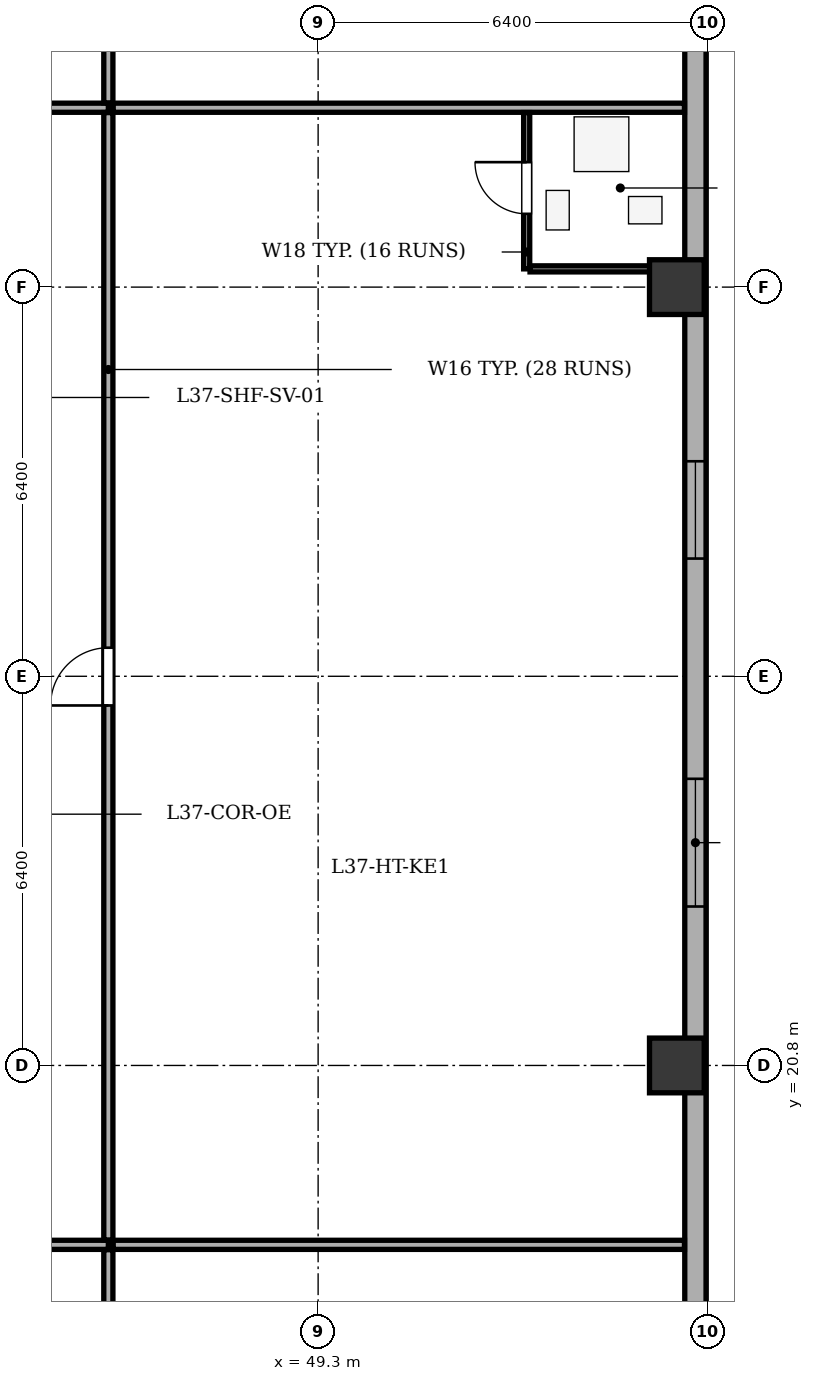
"""IFC4 building model, lengths in metres.
Left out: names, types, materials, properties, quantities, classifications, styles, units other than length and angle.
Written with IfcOpenShell. Run it as: python <this file> out.ifc"""

import sys

from ifc_helpers import new_model, si_unit, direction, frame, frame_2d, origin, origin_2d, place, context, subcontext, project, spatial, rectangle, extrude, element, fill, save


model = new_model("IFC4")
c1 = context("Model", 3, precision=1e-05, world=origin(), true_north=direction((0.0, 1.0)))
c2 = subcontext(c1, "Body", "Model", "MODEL_VIEW")
j1 = project(units=[si_unit("LENGTHUNIT", "METRE"), si_unit("PLANEANGLEUNIT", "RADIAN")], contexts=[c1])
p1 = place(None, origin())
s1 = spatial("IfcSite", under=j1, at=p1, CompositionType="ELEMENT")
p2 = place(p1, origin())
s2 = spatial("IfcBuilding", under=s1, at=p2, CompositionType="ELEMENT")
p3 = place(p2, frame((0.0, 0.0, 148.3)))
s3 = spatial("IfcBuildingStorey", under=s2, at=p3, CompositionType="ELEMENT", Elevation=148.3)
for number, where, z_axis, x_axis in (
    (1, (55.2, 20.8, 0.0), (0.0, 0.0, 1.0), (1.0, 0.0, 0.0)),
    (2, (55.2, 33.6, 0.0), (0.0, 0.0, 1.0), (1.0, 0.0, 0.0)),
):
    element("IfcColumn", number, at=place(p3, frame(where, z_axis=z_axis, x_axis=x_axis)), inside=s3, PredefinedType="COLUMN", context=c2, shape_type="SweptSolid", body=[
        extrude(rectangle(XDim=0.9, YDim=0.9, at=origin_2d()), origin(), (0.0, 0.0, 1.0), 3.5),
    ])
p4 = place(p3, frame((55.505, 41.5, 0.0), z_axis=(0.0, 0.0, 1.0), x_axis=(0.0, -1.0, 0.0)))
e3 = element("IfcWall", 3, at=p4, inside=s3, PredefinedType="STANDARD", context=c2, shape_type="SweptSolid", body=[
    extrude(rectangle(XDim=35.0, YDim=0.35, at=frame_2d((17.5, 0.0))), origin(), (0.0, 0.0, 1.0), 2.785),
])
p5 = place(p4, frame((1.813, 0.0, 0.75)))
e4 = element("IfcOpeningElement", 4, at=p5, cuts=e3, PredefinedType="OPENING", context=c2, shape_type="SweptSolid", body=[
    extrude(rectangle(XDim=1.6, YDim=1.75, at=frame_2d((0.8, 0.875))), frame((0.0, 0.185, 0.0), z_axis=(0.0, -1.0, 0.0), x_axis=(1.0, 0.0, 0.0)), (0.0, 0.0, 1.0), 0.37),
])
p6 = place(p4, frame((10.764, 0.0, 0.75)))
e5 = element("IfcOpeningElement", 5, at=p6, cuts=e3, PredefinedType="OPENING", context=c2, shape_type="SweptSolid", body=[
    extrude(rectangle(XDim=1.6, YDim=1.75, at=frame_2d((0.8, 0.875))), frame((0.0, 0.185, 0.0), z_axis=(0.0, -1.0, 0.0), x_axis=(1.0, 0.0, 0.0)), (0.0, 0.0, 1.0), 0.37),
])
p7 = place(p4, frame((15.986, 0.0, 0.75)))
e6 = element("IfcOpeningElement", 6, at=p7, cuts=e3, PredefinedType="OPENING", context=c2, shape_type="SweptSolid", body=[
    extrude(rectangle(XDim=2.1, YDim=1.75, at=frame_2d((1.05, 0.875))), frame((0.0, 0.185, 0.0), z_axis=(0.0, -1.0, 0.0), x_axis=(1.0, 0.0, 0.0)), (0.0, 0.0, 1.0), 0.37),
])
p8 = place(p4, frame((25.97, 0.0, 0.75)))
e7 = element("IfcOpeningElement", 7, at=p8, cuts=e3, PredefinedType="OPENING", context=c2, shape_type="SweptSolid", body=[
    extrude(rectangle(XDim=1.6, YDim=1.75, at=frame_2d((0.8, 0.875))), frame((0.0, 0.185, 0.0), z_axis=(0.0, -1.0, 0.0), x_axis=(1.0, 0.0, 0.0)), (0.0, 0.0, 1.0), 0.37),
])
p9 = place(p4, frame((30.555, 0.0, 0.75)))
e8 = element("IfcOpeningElement", 8, at=p9, cuts=e3, PredefinedType="OPENING", context=c2, shape_type="SweptSolid", body=[
    extrude(rectangle(XDim=2.1, YDim=1.75, at=frame_2d((1.05, 0.875))), frame((0.0, 0.185, 0.0), z_axis=(0.0, -1.0, 0.0), x_axis=(1.0, 0.0, 0.0)), (0.0, 0.0, 1.0), 0.37),
])
p10 = place(p3, frame((30.252, 17.85, 0.0), z_axis=(0.0, 0.0, 1.0), x_axis=(1.0, 0.0, 0.0)))
e9 = element("IfcWall", 9, at=p10, inside=s3, PredefinedType="PARTITIONING", context=c2, shape_type="SweptSolid", body=[
    extrude(rectangle(XDim=15.598, YDim=0.15, at=frame_2d((7.799, 0.0))), origin(), (0.0, 0.0, 1.0), 3.2),
])
p11 = place(p10, frame((7.239, 0.0, 0.0)))
e10 = element("IfcOpeningElement", 10, at=p11, cuts=e9, PredefinedType="OPENING", context=c2, shape_type="SweptSolid", body=[
    extrude(rectangle(XDim=1.0, YDim=2.1, at=frame_2d((0.5, 1.05))), frame((0.0, 0.085, 0.0), z_axis=(0.0, -1.0, 0.0), x_axis=(1.0, 0.0, 0.0)), (0.0, 0.0, 1.0), 0.17),
])
p12 = place(p3, frame((45.85, 1.875, 0.0), z_axis=(0.0, 0.0, 1.0), x_axis=(0.0, 1.0, 0.0)))
e11 = element("IfcWall", 11, at=p12, inside=s3, PredefinedType="PARTITIONING", context=c2, shape_type="SweptSolid", body=[
    extrude(rectangle(XDim=15.895, YDim=0.15, at=frame_2d((7.948, 0.0))), origin(), (0.0, 0.0, 1.0), 3.2),
])
p13 = place(p3, frame((41.771, 36.55, 0.0), z_axis=(0.0, 0.0, 1.0), x_axis=(1.0, 0.0, 0.0)))
e12 = element("IfcWall", 12, at=p13, inside=s3, PredefinedType="PARTITIONING", context=c2, shape_type="SweptSolid", body=[
    extrude(rectangle(XDim=4.079, YDim=0.15, at=frame_2d((2.04, 0.0))), origin(), (0.0, 0.0, 1.0), 3.2),
])
p14 = place(p13, frame((1.56, 0.0, 0.0)))
e13 = element("IfcOpeningElement", 13, at=p14, cuts=e12, PredefinedType="OPENING", context=c2, shape_type="SweptSolid", body=[
    extrude(rectangle(XDim=0.95, YDim=2.1, at=frame_2d((0.475, 1.05))), frame((0.0, 0.085, 0.0), z_axis=(0.0, -1.0, 0.0), x_axis=(1.0, 0.0, 0.0)), (0.0, 0.0, 1.0), 0.17),
])
p15 = place(p3, frame((45.85, 36.63, 0.0), z_axis=(0.0, 0.0, 1.0), x_axis=(0.0, 1.0, 0.0)))
e14 = element("IfcWall", 14, at=p15, inside=s3, PredefinedType="PARTITIONING", context=c2, shape_type="SweptSolid", body=[
    extrude(rectangle(XDim=9.495, YDim=0.15, at=frame_2d((4.748, 0.0))), origin(), (0.0, 0.0, 1.0), 3.2),
])
for number, where, z_axis, x_axis in (
    (15, (45.93, 17.85, 0.0), (0.0, 0.0, 1.0), (1.0, 0.0, 0.0)),
    (16, (45.93, 36.55, 0.0), (0.0, 0.0, 1.0), (1.0, 0.0, 0.0)),
):
    element("IfcWall", number, at=place(p3, frame(where, z_axis=z_axis, x_axis=x_axis)), inside=s3, PredefinedType="PARTITIONING", context=c2, shape_type="SweptSolid", body=[
        extrude(rectangle(XDim=9.395, YDim=0.15, at=frame_2d((4.698, 0.0))), origin(), (0.0, 0.0, 1.0), 3.2),
    ])
p16 = place(p3, frame((45.85, 17.93, 0.0), z_axis=(0.0, 0.0, 1.0), x_axis=(0.0, 1.0, 0.0)))
e17 = element("IfcWall", 17, at=p16, inside=s3, PredefinedType="PARTITIONING", context=c2, shape_type="SweptSolid", body=[
    extrude(rectangle(XDim=18.54, YDim=0.15, at=frame_2d((9.27, 0.0))), origin(), (0.0, 0.0, 1.0), 3.2),
])
p17 = place(p16, frame((8.79, 0.0, 0.0)))
e18 = element("IfcOpeningElement", 18, at=p17, cuts=e17, PredefinedType="OPENING", context=c2, shape_type="SweptSolid", body=[
    extrude(rectangle(XDim=0.95, YDim=2.1, at=frame_2d((0.475, 1.05))), frame((0.0, 0.085, 0.0), z_axis=(0.0, -1.0, 0.0), x_axis=(1.0, 0.0, 0.0)), (0.0, 0.0, 1.0), 0.17),
])
p18 = place(p3, frame((52.73, 33.9, 0.0), z_axis=(0.0, 0.0, 1.0), x_axis=(0.0, 1.0, 0.0)))
e19 = element("IfcWall", 19, at=p18, inside=s3, PredefinedType="PARTITIONING", context=c2, shape_type="SweptSolid", body=[
    extrude(rectangle(XDim=2.57, YDim=0.1, at=frame_2d((1.285, 0.0))), origin(), (0.0, 0.0, 1.0), 3.2),
])
p19 = place(p18, frame((0.905, 0.0, 0.0)))
e20 = element("IfcOpeningElement", 20, at=p19, cuts=e19, PredefinedType="OPENING", context=c2, shape_type="SweptSolid", body=[
    extrude(rectangle(XDim=0.85, YDim=2.05, at=frame_2d((0.425, 1.025))), frame((0.0, 0.06, 0.0), z_axis=(0.0, -1.0, 0.0), x_axis=(1.0, 0.0, 0.0)), (0.0, 0.0, 1.0), 0.12),
])
p20 = place(p3, frame((52.785, 33.9, 0.0), z_axis=(0.0, 0.0, 1.0), x_axis=(1.0, 0.0, 0.0)))
e21 = element("IfcWall", 21, at=p20, inside=s3, PredefinedType="PARTITIONING", context=c2, shape_type="SweptSolid", body=[
    extrude(rectangle(XDim=2.54, YDim=0.1, at=frame_2d((1.27, 0.0))), origin(), (0.0, 0.0, 1.0), 2.535),
])
p21 = place(p6, origin())
e22 = element("IfcWindow", 22, at=p21, inside=s3, PartitioningType="SINGLE_PANEL", PredefinedType="WINDOW", context=c2, shape_type="SweptSolid", body=[
    extrude(rectangle(XDim=1.6, YDim=1.75, at=frame_2d((0.8, 0.875))), frame((0.0, -0.01, 0.0), z_axis=(0.0, -1.0, 0.0), x_axis=(1.0, 0.0, 0.0)), (0.0, 0.0, 1.0), 0.06),
])
fill(e5, e22)
p22 = place(p7, origin())
e23 = element("IfcWindow", 23, at=p22, inside=s3, PartitioningType="SINGLE_PANEL", PredefinedType="WINDOW", context=c2, shape_type="SweptSolid", body=[
    extrude(rectangle(XDim=2.1, YDim=1.75, at=frame_2d((1.05, 0.875))), frame((0.0, -0.01, 0.0), z_axis=(0.0, -1.0, 0.0), x_axis=(1.0, 0.0, 0.0)), (0.0, 0.0, 1.0), 0.06),
])
fill(e6, e23)
p23 = place(p19, origin())
e24 = element("IfcDoor", 24, at=p23, inside=s3, OperationType="SINGLE_SWING_RIGHT", PredefinedType="DOOR", context=c2, shape_type="SweptSolid", body=[
    extrude(rectangle(XDim=0.85, YDim=2.05, at=frame_2d((0.425, 1.025))), frame((0.0, 0.025, 0.0), z_axis=(0.0, -1.0, 0.0), x_axis=(1.0, 0.0, 0.0)), (0.0, 0.0, 1.0), 0.05),
])
fill(e20, e24)
p24 = place(p17, origin())
e25 = element("IfcDoor", 25, at=p24, inside=s3, OperationType="SINGLE_SWING_LEFT", PredefinedType="DOOR", context=c2, shape_type="SweptSolid", body=[
    extrude(rectangle(XDim=0.95, YDim=2.1, at=frame_2d((0.475, 1.05))), frame((0.0, 0.025, 0.0), z_axis=(0.0, -1.0, 0.0), x_axis=(1.0, 0.0, 0.0)), (0.0, 0.0, 1.0), 0.05),
])
fill(e18, e25)
save(model, sys.argv[1])
